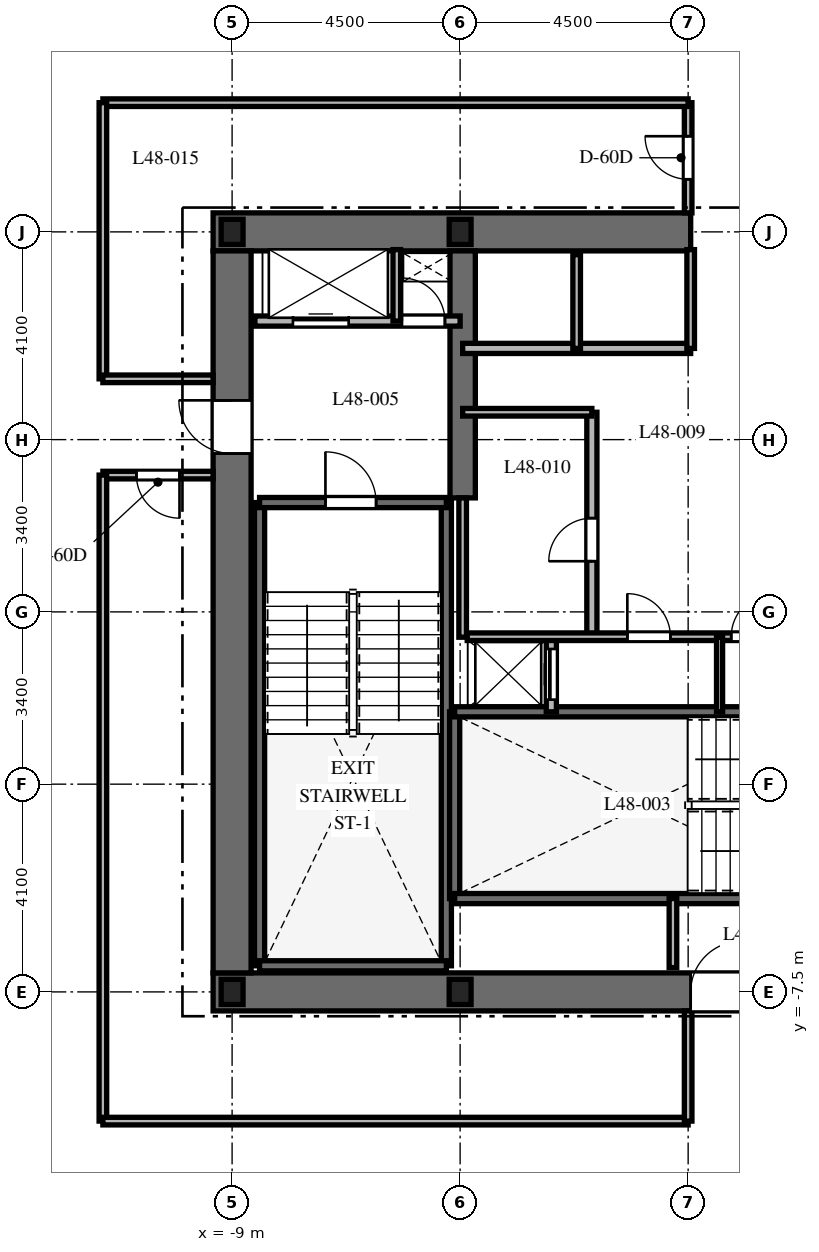
"""IFC4 building model, lengths in metres.
Left out: names, types, materials, properties, quantities, classifications, styles, units other than length and angle.
Written with IfcOpenShell. Run it as: python <this file> out.ifc"""

import sys

from ifc_helpers import new_model, si_unit, direction, frame, frame_2d, origin, origin_2d, place, context, subcontext, project, spatial, rectangle, i_section, extrude, element, fill, save


model = new_model("IFC4")
c1 = context("Model", 3, precision=1e-05, world=origin(), true_north=direction((0.0, 1.0)))
c2 = subcontext(c1, "Body", "Model", "MODEL_VIEW")
j1 = project(units=[si_unit("LENGTHUNIT", "METRE"), si_unit("PLANEANGLEUNIT", "RADIAN")], contexts=[c1])
p1 = place(None, origin())
s1 = spatial("IfcSite", under=j1, at=p1, CompositionType="ELEMENT")
p2 = place(p1, origin())
s2 = spatial("IfcBuilding", under=s1, at=p2, CompositionType="ELEMENT")
p3 = place(p2, frame((0.0, 0.0, 194.1)))
s3 = spatial("IfcBuildingStorey", under=s2, at=p3, CompositionType="ELEMENT", Elevation=194.1)
p4 = place(p3, frame((-9.375, -7.5, 0.0), z_axis=(0.0, 0.0, 1.0), x_axis=(1.0, 0.0, 0.0)))
e1 = element("IfcWall", 1, at=p4, inside=s3, PredefinedType="SHEAR", context=c2, shape_type="SweptSolid", body=[
    extrude(rectangle(XDim=18.75, YDim=0.75, at=frame_2d((9.375, 0.0))), origin(), (0.0, 0.0, 1.0), 3.7),
])
p5 = place(p4, frame((9.425, 0.0, 0.0)))
e2 = element("IfcOpeningElement", 2, at=p5, cuts=e1, PredefinedType="OPENING", context=c2, shape_type="SweptSolid", body=[
    extrude(rectangle(XDim=1.0, YDim=2.15, at=frame_2d((0.5, 1.075))), frame((0.0, 0.385, 0.0), z_axis=(0.0, -1.0, 0.0), x_axis=(1.0, 0.0, 0.0)), (0.0, 0.0, 1.0), 0.77),
])
p6 = place(p3, frame((-9.375, 7.5, 0.0), z_axis=(0.0, 0.0, 1.0), x_axis=(1.0, 0.0, 0.0)))
e3 = element("IfcWall", 3, at=p6, inside=s3, PredefinedType="SHEAR", context=c2, shape_type="SweptSolid", body=[
    extrude(rectangle(XDim=9.425, YDim=0.75, at=frame_2d((4.712, 0.0))), origin(), (0.0, 0.0, 1.0), 3.7),
])
p7 = place(p3, frame((-9.0, -7.125, 0.0), z_axis=(0.0, 0.0, 1.0), x_axis=(0.0, 1.0, 0.0)))
e4 = element("IfcWall", 4, at=p7, inside=s3, PredefinedType="SHEAR", context=c2, shape_type="SweptSolid", body=[
    extrude(rectangle(XDim=14.25, YDim=0.75, at=frame_2d((7.125, 0.0))), origin(), (0.0, 0.0, 1.0), 3.7),
])
p8 = place(p7, frame((10.25, 0.0, 0.0)))
e5 = element("IfcOpeningElement", 5, at=p8, cuts=e4, PredefinedType="OPENING", context=c2, shape_type="SweptSolid", body=[
    extrude(rectangle(XDim=1.05, YDim=2.15, at=frame_2d((0.525, 1.075))), frame((0.0, 0.385, 0.0), z_axis=(0.0, -1.0, 0.0), x_axis=(1.0, 0.0, 0.0)), (0.0, 0.0, 1.0), 0.77),
])
p9 = place(p3, frame((-4.45, 2.25, 0.0), z_axis=(0.0, 0.0, 1.0), x_axis=(0.0, 1.0, 0.0)))
e6 = element("IfcWall", 6, at=p9, inside=s3, PredefinedType="SHEAR", context=c2, shape_type="SweptSolid", body=[
    extrude(rectangle(XDim=4.875, YDim=0.5, at=frame_2d((2.438, 0.0))), origin(), (0.0, 0.0, 1.0), 3.7),
])
for number, where, z_axis, x_axis in (
    (7, (-8.458, -6.985, 0.0), (0.0, 0.0, 1.0), (0.0, 1.0, 0.0)),
    (8, (-4.772, -6.985, 0.0), (0.0, 0.0, 1.0), (0.0, 1.0, 0.0)),
):
    element("IfcWall", number, at=place(p3, frame(where, z_axis=z_axis, x_axis=x_axis)), inside=s3, PredefinedType="SHEAR", context=c2, shape_type="SweptSolid", body=[
        extrude(rectangle(XDim=9.143, YDim=0.2, at=frame_2d((4.572, 0.0))), origin(), (0.0, 0.0, 1.0), 3.7),
    ])
p10 = place(p3, frame((-8.458, -6.985, 0.0), z_axis=(0.0, 0.0, 1.0), x_axis=(1.0, 0.0, 0.0)))
e9 = element("IfcWall", 9, at=p10, inside=s3, PredefinedType="SHEAR", context=c2, shape_type="SweptSolid", body=[
    extrude(rectangle(XDim=3.686, YDim=0.2, at=frame_2d((1.843, 0.0))), origin(), (0.0, 0.0, 1.0), 3.7),
])
p11 = place(p3, frame((-8.458, 2.158, 0.0), z_axis=(0.0, 0.0, 1.0), x_axis=(1.0, 0.0, 0.0)))
e10 = element("IfcWall", 10, at=p11, inside=s3, PredefinedType="SHEAR", context=c2, shape_type="SweptSolid", body=[
    extrude(rectangle(XDim=3.686, YDim=0.2, at=frame_2d((1.843, 0.0))), origin(), (0.0, 0.0, 1.0), 3.7),
])
p12 = place(p11, frame((1.3, 0.0, 0.0)))
e11 = element("IfcOpeningElement", 11, at=p12, cuts=e10, PredefinedType="OPENING", context=c2, shape_type="SweptSolid", body=[
    extrude(rectangle(XDim=1.0, YDim=2.15, at=frame_2d((0.5, 1.075))), frame((0.0, 0.11, 0.0), z_axis=(0.0, -1.0, 0.0), x_axis=(1.0, 0.0, 0.0)), (0.0, 0.0, 1.0), 0.22),
])
p13 = place(p3, frame((-4.608, -5.658, 0.0), z_axis=(0.0, 0.0, 1.0), x_axis=(0.0, 1.0, 0.0)))
e12 = element("IfcWall", 12, at=p13, inside=s3, PredefinedType="SHEAR", context=c2, shape_type="SweptSolid", body=[
    extrude(rectangle(XDim=3.686, YDim=0.2, at=frame_2d((1.843, 0.0))), origin(), (0.0, 0.0, 1.0), 3.7),
])
p14 = place(p3, frame((-4.608, -5.658, 0.0), z_axis=(0.0, 0.0, 1.0), x_axis=(1.0, 0.0, 0.0)))
e13 = element("IfcWall", 13, at=p14, inside=s3, PredefinedType="SHEAR", context=c2, shape_type="SweptSolid", body=[
    extrude(rectangle(XDim=9.166, YDim=0.2, at=frame_2d((4.583, 0.0))), origin(), (0.0, 0.0, 1.0), 3.7),
])
p15 = place(p14, frame((7.45, 0.0, 0.0)))
e14 = element("IfcOpeningElement", 14, at=p15, cuts=e13, PredefinedType="OPENING", context=c2, shape_type="SweptSolid", body=[
    extrude(rectangle(XDim=1.0, YDim=2.15, at=frame_2d((0.5, 1.075))), frame((0.0, 0.11, 0.0), z_axis=(0.0, -1.0, 0.0), x_axis=(1.0, 0.0, 0.0)), (0.0, 0.0, 1.0), 0.22),
])
p16 = place(p3, frame((-4.608, -1.972, 0.0), z_axis=(0.0, 0.0, 1.0), x_axis=(1.0, 0.0, 0.0)))
e15 = element("IfcWall", 15, at=p16, inside=s3, PredefinedType="SHEAR", context=c2, shape_type="SweptSolid", body=[
    extrude(rectangle(XDim=9.166, YDim=0.2, at=frame_2d((4.583, 0.0))), origin(), (0.0, 0.0, 1.0), 3.7),
])
for number, where, z_axis, x_axis in (
    (16, (-9.0, -7.5, 0.0), (0.0, 0.0, 1.0), (1.0, 0.0, 0.0)),
    (17, (-4.5, -7.5, 0.0), (0.0, 0.0, 1.0), (1.0, 0.0, 0.0)),
    (18, (-4.5, 7.5, 0.0), (0.0, 0.0, 1.0), (1.0, 0.0, 0.0)),
    (19, (-9.0, 7.5, 0.0), (0.0, 0.0, 1.0), (1.0, 0.0, 0.0)),
):
    element("IfcColumn", number, at=place(p3, frame(where, z_axis=z_axis, x_axis=x_axis)), inside=s3, PredefinedType="COLUMN", context=c2, shape_type="SweptSolid", body=[
        extrude(i_section(OverallWidth=0.432, OverallDepth=0.498, WebThickness=0.056, FlangeThickness=0.089, at=origin_2d()), origin(), (0.0, 0.0, 1.0), 3.7),
    ])
p17 = place(p3, frame((-0.3, -7.02, 0.0), z_axis=(0.0, 0.0, 1.0), x_axis=(0.0, 1.0, 0.0)))
e20 = element("IfcWall", 20, at=p17, inside=s3, PredefinedType="PARTITIONING", context=c2, shape_type="SweptSolid", body=[
    extrude(rectangle(XDim=1.362, YDim=0.15, at=frame_2d((0.681, 0.0))), origin(), (0.0, 0.0, 1.0), 3.4),
])
p18 = place(p3, frame((-8.55, 5.74, 0.0), z_axis=(0.0, 0.0, 1.0), x_axis=(1.0, 0.0, 0.0)))
e21 = element("IfcWall", 21, at=p18, inside=s3, PredefinedType="PARTITIONING", context=c2, shape_type="SweptSolid", body=[
    extrude(rectangle(XDim=4.05, YDim=0.2, at=frame_2d((2.025, 0.0))), origin(), (0.0, 0.0, 1.0), 3.4),
])
p19 = place(p18, frame((0.75, 0.0, 0.0)))
e22 = element("IfcOpeningElement", 22, at=p19, cuts=e21, PredefinedType="OPENING", context=c2, shape_type="SweptSolid", body=[
    extrude(rectangle(XDim=1.1, YDim=2.2, at=frame_2d((0.55, 1.1))), frame((0.0, 0.11, 0.0), z_axis=(0.0, -1.0, 0.0), x_axis=(1.0, 0.0, 0.0)), (0.0, 0.0, 1.0), 0.22),
])
p20 = place(p18, frame((2.9, 0.0, 0.0)))
e23 = element("IfcOpeningElement", 23, at=p20, cuts=e21, PredefinedType="OPENING", context=c2, shape_type="SweptSolid", body=[
    extrude(rectangle(XDim=0.85, YDim=2.03, at=frame_2d((0.425, 1.015))), frame((0.0, 0.11, 0.0), z_axis=(0.0, -1.0, 0.0), x_axis=(1.0, 0.0, 0.0)), (0.0, 0.0, 1.0), 0.22),
])
p21 = place(p3, frame((-5.75, 5.74, 0.0), z_axis=(0.0, 0.0, 1.0), x_axis=(0.0, 1.0, 0.0)))
e24 = element("IfcWall", 24, at=p21, inside=s3, PredefinedType="PARTITIONING", context=c2, shape_type="SweptSolid", body=[
    extrude(rectangle(XDim=1.41, YDim=0.15, at=frame_2d((0.705, 0.0))), origin(), (0.0, 0.0, 1.0), 3.4),
])
p22 = place(p3, frame((-2.7, -1.972, 0.0), z_axis=(0.0, 0.0, 1.0), x_axis=(0.0, 1.0, 0.0)))
e25 = element("IfcWall", 25, at=p22, inside=s3, PredefinedType="PARTITIONING", context=c2, shape_type="SweptSolid", body=[
    extrude(rectangle(XDim=1.472, YDim=0.2, at=frame_2d((0.736, 0.0))), origin(), (0.0, 0.0, 1.0), 3.4),
])
p23 = place(p22, frame((0.24, 0.0, 0.0)))
e26 = element("IfcOpeningElement", 26, at=p23, cuts=e25, PredefinedType="OPENING", context=c2, shape_type="SweptSolid", body=[
    extrude(rectangle(XDim=1.0, YDim=2.2, at=frame_2d((0.5, 1.1))), frame((0.0, 0.11, 0.0), z_axis=(0.0, -1.0, 0.0), x_axis=(1.0, 0.0, 0.0)), (0.0, 0.0, 1.0), 0.22),
])
p24 = place(p3, frame((-4.45, 5.2, 0.0), z_axis=(0.0, 0.0, 1.0), x_axis=(1.0, 0.0, 0.0)))
e27 = element("IfcWall", 27, at=p24, inside=s3, PredefinedType="PARTITIONING", context=c2, shape_type="SweptSolid", body=[
    extrude(rectangle(XDim=4.5, YDim=0.2, at=frame_2d((2.25, 0.0))), origin(), (0.0, 0.0, 1.0), 3.4),
])
p25 = place(p3, frame((-2.2, 5.2, 0.0), z_axis=(0.0, 0.0, 1.0), x_axis=(0.0, 1.0, 0.0)))
e28 = element("IfcWall", 28, at=p25, inside=s3, PredefinedType="PARTITIONING", context=c2, shape_type="SweptSolid", body=[
    extrude(rectangle(XDim=1.85, YDim=0.15, at=frame_2d((0.925, 0.0))), origin(), (0.0, 0.0, 1.0), 3.4),
])
p26 = place(p3, frame((0.05, 5.2, 0.0), z_axis=(0.0, 0.0, 1.0), x_axis=(0.0, 1.0, 0.0)))
e29 = element("IfcWall", 29, at=p26, inside=s3, PredefinedType="PARTITIONING", context=c2, shape_type="SweptSolid", body=[
    extrude(rectangle(XDim=1.95, YDim=0.15, at=frame_2d((0.975, 0.0))), origin(), (0.0, 0.0, 1.0), 3.4),
])
p27 = place(p3, frame((-4.45, -0.5, 0.0), z_axis=(0.0, 0.0, 1.0), x_axis=(0.0, 1.0, 0.0)))
e30 = element("IfcWall", 30, at=p27, inside=s3, PredefinedType="PARTITIONING", context=c2, shape_type="SweptSolid", body=[
    extrude(rectangle(XDim=2.75, YDim=0.15, at=frame_2d((1.375, 0.0))), origin(), (0.0, 0.0, 1.0), 3.4),
])
p28 = place(p3, frame((-1.9, -0.5, 0.0), z_axis=(0.0, 0.0, 1.0), x_axis=(0.0, 1.0, 0.0)))
e31 = element("IfcWall", 31, at=p28, inside=s3, PredefinedType="PARTITIONING", context=c2, shape_type="SweptSolid", body=[
    extrude(rectangle(XDim=4.44, YDim=0.2, at=frame_2d((2.22, 0.0))), origin(), (0.0, 0.0, 1.0), 3.4),
])
p29 = place(p28, frame((1.5, 0.0, 0.0)))
e32 = element("IfcOpeningElement", 32, at=p29, cuts=e31, PredefinedType="OPENING", context=c2, shape_type="SweptSolid", body=[
    extrude(rectangle(XDim=0.85, YDim=2.03, at=frame_2d((0.425, 1.015))), frame((0.0, 0.11, 0.0), z_axis=(0.0, -1.0, 0.0), x_axis=(1.0, 0.0, 0.0)), (0.0, 0.0, 1.0), 0.22),
])
p30 = place(p3, frame((-4.45, 3.94, 0.0), z_axis=(0.0, 0.0, 1.0), x_axis=(1.0, 0.0, 0.0)))
e33 = element("IfcWall", 33, at=p30, inside=s3, PredefinedType="PARTITIONING", context=c2, shape_type="SweptSolid", body=[
    extrude(rectangle(XDim=2.55, YDim=0.15, at=frame_2d((1.275, 0.0))), origin(), (0.0, 0.0, 1.0), 3.4),
])
p31 = place(p3, frame((-4.36, -0.49, 0.0), z_axis=(0.0, 0.0, 1.0), x_axis=(1.0, 0.0, 0.0)))
e34 = element("IfcWall", 34, at=p31, inside=s3, PredefinedType="PARTITIONING", context=c2, shape_type="SweptSolid", body=[
    extrude(rectangle(XDim=8.72, YDim=0.15, at=frame_2d((4.36, 0.0))), origin(), (0.0, 0.0, 1.0), 3.4),
])
p32 = place(p31, frame((3.16, 0.0, 0.0)))
e35 = element("IfcOpeningElement", 35, at=p32, cuts=e34, PredefinedType="OPENING", context=c2, shape_type="SweptSolid", body=[
    extrude(rectangle(XDim=0.85, YDim=2.03, at=frame_2d((0.425, 1.015))), frame((0.0, 0.085, 0.0), z_axis=(0.0, -1.0, 0.0), x_axis=(1.0, 0.0, 0.0)), (0.0, 0.0, 1.0), 0.17),
])
p33 = place(p31, frame((5.21, 0.0, 0.0)))
e36 = element("IfcOpeningElement", 36, at=p33, cuts=e34, PredefinedType="OPENING", context=c2, shape_type="SweptSolid", body=[
    extrude(rectangle(XDim=0.85, YDim=2.03, at=frame_2d((0.425, 1.015))), frame((0.0, 0.085, 0.0), z_axis=(0.0, -1.0, 0.0), x_axis=(1.0, 0.0, 0.0)), (0.0, 0.0, 1.0), 0.17),
])
p34 = place(p3, frame((0.62, -1.972, 0.0), z_axis=(0.0, 0.0, 1.0), x_axis=(0.0, 1.0, 0.0)))
e37 = element("IfcWall", 37, at=p34, inside=s3, PredefinedType="PARTITIONING", context=c2, shape_type="SweptSolid", body=[
    extrude(rectangle(XDim=1.472, YDim=0.12, at=frame_2d((0.736, 0.0))), origin(), (0.0, 0.0, 1.0), 3.4),
])
p35 = place(p3, frame((0.0, 7.875, 0.0), z_axis=(0.0, 0.0, 1.0), x_axis=(0.0, 1.0, 0.0)))
e38 = element("IfcWall", 38, at=p35, inside=s3, PredefinedType="PARTITIONING", context=c2, shape_type="SweptSolid", body=[
    extrude(rectangle(XDim=2.175, YDim=0.15, at=frame_2d((1.087, 0.0))), origin(), (0.0, 0.0, 1.0), 3.4),
])
p36 = place(p35, frame((0.663, 0.0, 0.0)))
e39 = element("IfcOpeningElement", 39, at=p36, cuts=e38, PredefinedType="OPENING", context=c2, shape_type="SweptSolid", body=[
    extrude(rectangle(XDim=0.85, YDim=2.03, at=frame_2d((0.425, 1.015))), frame((0.0, 0.085, 0.0), z_axis=(0.0, -1.0, 0.0), x_axis=(1.0, 0.0, 0.0)), (0.0, 0.0, 1.0), 0.17),
])
p37 = place(p3, frame((0.0, 10.05, 0.0), z_axis=(0.0, 0.0, 1.0), x_axis=(-1.0, 0.0, 0.0)))
e40 = element("IfcWall", 40, at=p37, inside=s3, PredefinedType="PARTITIONING", context=c2, shape_type="SweptSolid", body=[
    extrude(rectangle(XDim=11.55, YDim=0.15, at=frame_2d((5.775, 0.0))), origin(), (0.0, 0.0, 1.0), 2.84),
])
p38 = place(p3, frame((-11.55, 10.05, 0.0), z_axis=(0.0, 0.0, 1.0), x_axis=(0.0, -1.0, 0.0)))
e41 = element("IfcWall", 41, at=p38, inside=s3, PredefinedType="PARTITIONING", context=c2, shape_type="SweptSolid", body=[
    extrude(rectangle(XDim=5.45, YDim=0.15, at=frame_2d((2.725, 0.0))), origin(), (0.0, 0.0, 1.0), 2.84),
])
p39 = place(p3, frame((-11.55, 4.6, 0.0), z_axis=(0.0, 0.0, 1.0), x_axis=(1.0, 0.0, 0.0)))
e42 = element("IfcWall", 42, at=p39, inside=s3, PredefinedType="PARTITIONING", context=c2, shape_type="SweptSolid", body=[
    extrude(rectangle(XDim=2.175, YDim=0.15, at=frame_2d((1.087, 0.0))), origin(), (0.0, 0.0, 1.0), 3.4),
])
p40 = place(p3, frame((-9.375, 2.7, 0.0), z_axis=(0.0, 0.0, 1.0), x_axis=(-1.0, 0.0, 0.0)))
e43 = element("IfcWall", 43, at=p40, inside=s3, PredefinedType="PARTITIONING", context=c2, shape_type="SweptSolid", body=[
    extrude(rectangle(XDim=2.175, YDim=0.15, at=frame_2d((1.087, 0.0))), origin(), (0.0, 0.0, 1.0), 3.4),
])
p41 = place(p40, frame((0.663, 0.0, 0.0)))
e44 = element("IfcOpeningElement", 44, at=p41, cuts=e43, PredefinedType="OPENING", context=c2, shape_type="SweptSolid", body=[
    extrude(rectangle(XDim=0.85, YDim=2.03, at=frame_2d((0.425, 1.015))), frame((0.0, 0.085, 0.0), z_axis=(0.0, -1.0, 0.0), x_axis=(1.0, 0.0, 0.0)), (0.0, 0.0, 1.0), 0.17),
])
p42 = place(p3, frame((-11.55, 2.7, 0.0), z_axis=(0.0, 0.0, 1.0), x_axis=(0.0, -1.0, 0.0)))
e45 = element("IfcWall", 45, at=p42, inside=s3, PredefinedType="PARTITIONING", context=c2, shape_type="SweptSolid", body=[
    extrude(rectangle(XDim=12.75, YDim=0.15, at=frame_2d((6.375, 0.0))), origin(), (0.0, 0.0, 1.0), 2.84),
])
p43 = place(p3, frame((-11.55, -10.05, 0.0), z_axis=(0.0, 0.0, 1.0), x_axis=(1.0, 0.0, 0.0)))
e46 = element("IfcWall", 46, at=p43, inside=s3, PredefinedType="PARTITIONING", context=c2, shape_type="SweptSolid", body=[
    extrude(rectangle(XDim=11.55, YDim=0.15, at=frame_2d((5.775, 0.0))), origin(), (0.0, 0.0, 1.0), 2.84),
])
p44 = place(p3, frame((0.0, -10.05, 0.0), z_axis=(0.0, 0.0, 1.0), x_axis=(0.0, 1.0, 0.0)))
e47 = element("IfcWall", 47, at=p44, inside=s3, PredefinedType="PARTITIONING", context=c2, shape_type="SweptSolid", body=[
    extrude(rectangle(XDim=2.175, YDim=0.15, at=frame_2d((1.087, 0.0))), origin(), (0.0, 0.0, 1.0), 3.4),
])
p45 = place(p12, origin())
e48 = element("IfcDoor", 48, at=p45, inside=s3, OperationType="SINGLE_SWING_LEFT", PredefinedType="DOOR", context=c2, shape_type="SweptSolid", body=[
    extrude(rectangle(XDim=1.0, YDim=2.15, at=frame_2d((0.5, 1.075))), frame((0.0, 0.025, 0.0), z_axis=(0.0, -1.0, 0.0), x_axis=(1.0, 0.0, 0.0)), (0.0, 0.0, 1.0), 0.05),
])
fill(e11, e48)
p46 = place(p5, origin())
e49 = element("IfcDoor", 49, at=p46, inside=s3, OperationType="SINGLE_SWING_RIGHT", PredefinedType="DOOR", context=c2, shape_type="SweptSolid", body=[
    extrude(rectangle(XDim=1.0, YDim=2.15, at=frame_2d((0.5, 1.075))), frame((0.0, 0.025, 0.0), z_axis=(0.0, -1.0, 0.0), x_axis=(1.0, 0.0, 0.0)), (0.0, 0.0, 1.0), 0.05),
])
fill(e2, e49)
p47 = place(p8, origin())
e50 = element("IfcDoor", 50, at=p47, inside=s3, OperationType="SINGLE_SWING_RIGHT", PredefinedType="DOOR", context=c2, shape_type="SweptSolid", body=[
    extrude(rectangle(XDim=1.05, YDim=2.15, at=frame_2d((0.525, 1.075))), frame((0.0, 0.025, 0.0), z_axis=(0.0, -1.0, 0.0), x_axis=(1.0, 0.0, 0.0)), (0.0, 0.0, 1.0), 0.05),
])
fill(e5, e50)
p48 = place(p19, origin())
e51 = element("IfcDoor", 51, at=p48, inside=s3, OperationType="SLIDING_TO_LEFT", PredefinedType="DOOR", context=c2, shape_type="SweptSolid", body=[
    extrude(rectangle(XDim=1.1, YDim=2.2, at=frame_2d((0.55, 1.1))), frame((0.0, 0.025, 0.0), z_axis=(0.0, -1.0, 0.0), x_axis=(1.0, 0.0, 0.0)), (0.0, 0.0, 1.0), 0.05),
])
fill(e22, e51)
p49 = place(p20, origin())
e52 = element("IfcDoor", 52, at=p49, inside=s3, OperationType="SINGLE_SWING_LEFT", PredefinedType="DOOR", context=c2, shape_type="SweptSolid", body=[
    extrude(rectangle(XDim=0.85, YDim=2.03, at=frame_2d((0.425, 1.015))), frame((0.0, 0.025, 0.0), z_axis=(0.0, -1.0, 0.0), x_axis=(1.0, 0.0, 0.0)), (0.0, 0.0, 1.0), 0.05),
])
fill(e23, e52)
p50 = place(p23, origin())
e53 = element("IfcDoor", 53, at=p50, inside=s3, OperationType="SLIDING_TO_LEFT", PredefinedType="DOOR", context=c2, shape_type="SweptSolid", body=[
    extrude(rectangle(XDim=1.0, YDim=2.2, at=frame_2d((0.5, 1.1))), frame((0.0, 0.025, 0.0), z_axis=(0.0, -1.0, 0.0), x_axis=(1.0, 0.0, 0.0)), (0.0, 0.0, 1.0), 0.05),
])
fill(e26, e53)
p51 = place(p29, origin())
e54 = element("IfcDoor", 54, at=p51, inside=s3, OperationType="SINGLE_SWING_LEFT", PredefinedType="DOOR", context=c2, shape_type="SweptSolid", body=[
    extrude(rectangle(XDim=0.85, YDim=2.03, at=frame_2d((0.425, 1.015))), frame((0.0, 0.025, 0.0), z_axis=(0.0, -1.0, 0.0), x_axis=(1.0, 0.0, 0.0)), (0.0, 0.0, 1.0), 0.05),
])
fill(e32, e54)
p52 = place(p32, origin())
e55 = element("IfcDoor", 55, at=p52, inside=s3, OperationType="SINGLE_SWING_LEFT", PredefinedType="DOOR", context=c2, shape_type="SweptSolid", body=[
    extrude(rectangle(XDim=0.85, YDim=2.03, at=frame_2d((0.425, 1.015))), frame((0.0, 0.025, 0.0), z_axis=(0.0, -1.0, 0.0), x_axis=(1.0, 0.0, 0.0)), (0.0, 0.0, 1.0), 0.05),
])
fill(e35, e55)
p53 = place(p33, origin())
e56 = element("IfcDoor", 56, at=p53, inside=s3, OperationType="SINGLE_SWING_RIGHT", PredefinedType="DOOR", context=c2, shape_type="SweptSolid", body=[
    extrude(rectangle(XDim=0.85, YDim=2.03, at=frame_2d((0.425, 1.015))), frame((0.0, 0.025, 0.0), z_axis=(0.0, -1.0, 0.0), x_axis=(1.0, 0.0, 0.0)), (0.0, 0.0, 1.0), 0.05),
])
fill(e36, e56)
p54 = place(p41, origin())
e57 = element("IfcDoor", 57, at=p54, inside=s3, OperationType="SINGLE_SWING_LEFT", PredefinedType="DOOR", context=c2, shape_type="SweptSolid", body=[
    extrude(rectangle(XDim=0.85, YDim=2.03, at=frame_2d((0.425, 1.015))), frame((0.0, 0.025, 0.0), z_axis=(0.0, -1.0, 0.0), x_axis=(1.0, 0.0, 0.0)), (0.0, 0.0, 1.0), 0.05),
])
fill(e44, e57)
p55 = place(p36, origin())
e58 = element("IfcDoor", 58, at=p55, inside=s3, OperationType="SINGLE_SWING_RIGHT", PredefinedType="DOOR", context=c2, shape_type="SweptSolid", body=[
    extrude(rectangle(XDim=0.85, YDim=2.03, at=frame_2d((0.425, 1.015))), frame((0.0, 0.025, 0.0), z_axis=(0.0, -1.0, 0.0), x_axis=(1.0, 0.0, 0.0)), (0.0, 0.0, 1.0), 0.05),
])
fill(e39, e58)
save(model, sys.argv[1])
